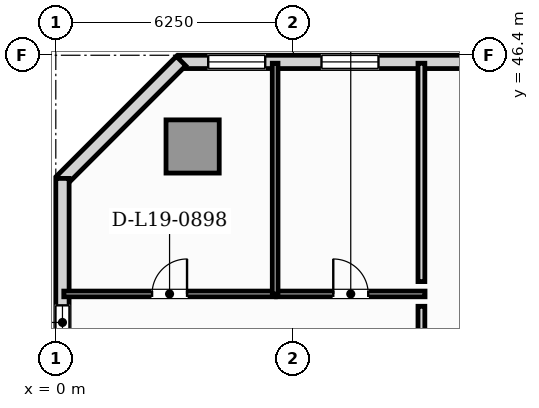
"""IFC4 building model, lengths in metres.
Left out: names, types, materials, properties, quantities, classifications, styles, units other than length and angle.
Written with IfcOpenShell. Run it as: python <this file> out.ifc"""

import sys

from ifc_helpers import new_model, si_unit, direction, frame, frame_2d, origin, origin_2d, place, context, subcontext, project, spatial, rectangle, hollow_rectangle, extrude, element, fill, save


model = new_model("IFC4")
c1 = context("Model", 3, precision=1e-05, world=origin(), true_north=direction((0.0, 1.0)))
c2 = subcontext(c1, "Body", "Model", "MODEL_VIEW")
j1 = project(units=[si_unit("LENGTHUNIT", "METRE"), si_unit("PLANEANGLEUNIT", "RADIAN")], contexts=[c1])
p1 = place(None, origin())
s1 = spatial("IfcSite", under=j1, at=p1, CompositionType="ELEMENT")
p2 = place(p1, origin())
s2 = spatial("IfcBuilding", under=s1, at=p2, CompositionType="ELEMENT")
p3 = place(p2, frame((0.0, 0.0, 81.05)))
s3 = spatial("IfcBuildingStorey", under=s2, at=p3, CompositionType="ELEMENT", Elevation=81.05)
p4 = place(p3, frame((3.6, 44.0, 0.0), z_axis=(0.0, 0.0, 1.0), x_axis=(1.0, 0.0, 0.0)))
e1 = element("IfcColumn", 1, at=p4, inside=s3, PredefinedType="USERDEFINED", context=c2, shape_type="SweptSolid", body=[
    extrude(hollow_rectangle(XDim=1.4, YDim=1.4, WallThickness=0.08, at=origin_2d()), origin(), (0.0, 0.0, 1.0), 3.85),
])
p5 = place(p3, frame((21.71, 46.225, 0.0), z_axis=(0.0, 0.0, 1.0), x_axis=(-1.0, 0.0, 0.0)))
e2 = element("IfcWall", 2, at=p5, inside=s3, PredefinedType="SOLIDWALL", context=c2, shape_type="SweptSolid", body=[
    extrude(rectangle(XDim=18.47, YDim=0.35, at=frame_2d((9.235, 0.0))), origin(), (0.0, 0.0, 1.0), 3.6),
])
p6 = place(p5, frame((16.2, 0.0, 0.9)))
e3 = element("IfcOpeningElement", 3, at=p6, cuts=e2, PredefinedType="OPENING", context=c2, shape_type="SweptSolid", body=[
    extrude(rectangle(XDim=1.5, YDim=1.95, at=frame_2d((0.75, 0.975))), frame((0.0, 0.185, 0.0), z_axis=(0.0, -1.0, 0.0), x_axis=(1.0, 0.0, 0.0)), (0.0, 0.0, 1.0), 0.37),
])
p7 = place(p5, frame((13.219, 0.0, 0.9)))
e4 = element("IfcOpeningElement", 4, at=p7, cuts=e2, PredefinedType="OPENING", context=c2, shape_type="SweptSolid", body=[
    extrude(rectangle(XDim=1.5, YDim=1.95, at=frame_2d((0.75, 0.975))), frame((0.0, 0.185, 0.0), z_axis=(0.0, -1.0, 0.0), x_axis=(1.0, 0.0, 0.0)), (0.0, 0.0, 1.0), 0.37),
])
p8 = place(p5, frame((6.384, 0.0, 0.9)))
e5 = element("IfcOpeningElement", 5, at=p8, cuts=e2, PredefinedType="OPENING", context=c2, shape_type="SweptSolid", body=[
    extrude(rectangle(XDim=1.5, YDim=1.95, at=frame_2d((0.75, 0.975))), frame((0.0, 0.185, 0.0), z_axis=(0.0, -1.0, 0.0), x_axis=(1.0, 0.0, 0.0)), (0.0, 0.0, 1.0), 0.37),
])
p9 = place(p3, frame((3.295, 46.248, 0.0), z_axis=(0.0, 0.0, 1.0), x_axis=(-0.707079321262, -0.707134240044, 0.0)))
e6 = element("IfcWall", 6, at=p9, inside=s3, PredefinedType="SOLIDWALL", context=c2, shape_type="SweptSolid", body=[
    extrude(rectangle(XDim=4.446, YDim=0.35, at=frame_2d((2.223, 0.0))), origin(), (0.0, 0.0, 1.0), 3.6),
])
p10 = place(p3, frame((0.175, 43.16, 0.0), z_axis=(0.0, 0.0, 1.0), x_axis=(0.0, -1.0, 0.0)))
e7 = element("IfcWall", 7, at=p10, inside=s3, PredefinedType="SOLIDWALL", context=c2, shape_type="SweptSolid", body=[
    extrude(rectangle(XDim=39.92, YDim=0.35, at=frame_2d((19.96, 0.0))), origin(), (0.0, 0.0, 1.0), 3.6),
])
p11 = place(p10, frame((3.34, 0.0, 0.95)))
e8 = element("IfcOpeningElement", 8, at=p11, cuts=e7, PredefinedType="OPENING", context=c2, shape_type="SweptSolid", body=[
    extrude(rectangle(XDim=0.9, YDim=1.5, at=frame_2d((0.45, 0.75))), frame((0.0, 0.185, 0.0), z_axis=(0.0, -1.0, 0.0), x_axis=(1.0, 0.0, 0.0)), (0.0, 0.0, 1.0), 0.37),
])
p12 = place(p10, frame((23.517, 0.0, 0.9)))
e9 = element("IfcOpeningElement", 9, at=p12, cuts=e7, PredefinedType="OPENING", context=c2, shape_type="SweptSolid", body=[
    extrude(rectangle(XDim=1.5, YDim=1.95, at=frame_2d((0.75, 0.975))), frame((0.0, 0.185, 0.0), z_axis=(0.0, -1.0, 0.0), x_axis=(1.0, 0.0, 0.0)), (0.0, 0.0, 1.0), 0.37),
])
p13 = place(p10, frame((12.587, 0.0, 0.9)))
e10 = element("IfcOpeningElement", 10, at=p13, cuts=e7, PredefinedType="OPENING", context=c2, shape_type="SweptSolid", body=[
    extrude(rectangle(XDim=1.5, YDim=1.95, at=frame_2d((0.75, 0.975))), frame((0.0, 0.185, 0.0), z_axis=(0.0, -1.0, 0.0), x_axis=(1.0, 0.0, 0.0)), (0.0, 0.0, 1.0), 0.37),
])
p14 = place(p3, frame((0.21, 40.12, 0.0), z_axis=(0.0, 0.0, 1.0), x_axis=(1.0, 0.0, 0.0)))
e11 = element("IfcWall", 11, at=p14, inside=s3, PredefinedType="PARTITIONING", context=c2, shape_type="SweptSolid", body=[
    extrude(rectangle(XDim=5.566, YDim=0.15, at=frame_2d((2.783, 0.0))), origin(), (0.0, 0.0, 1.0), 3.6),
])
p15 = place(p14, frame((2.323, 0.0, 0.0)))
e12 = element("IfcOpeningElement", 12, at=p15, cuts=e11, PredefinedType="OPENING", context=c2, shape_type="SweptSolid", body=[
    extrude(rectangle(XDim=0.92, YDim=2.1, at=frame_2d((0.46, 1.05))), frame((0.0, 0.085, 0.0), z_axis=(0.0, -1.0, 0.0), x_axis=(1.0, 0.0, 0.0)), (0.0, 0.0, 1.0), 0.17),
])
p16 = place(p3, frame((5.806, 40.12, 0.0), z_axis=(0.0, 0.0, 1.0), x_axis=(1.0, 0.0, 0.0)))
e13 = element("IfcWall", 13, at=p16, inside=s3, PredefinedType="PARTITIONING", context=c2, shape_type="SweptSolid", body=[
    extrude(rectangle(XDim=3.909, YDim=0.15, at=frame_2d((1.955, 0.0))), origin(), (0.0, 0.0, 1.0), 3.6),
])
p17 = place(p16, frame((1.494, 0.0, 0.0)))
e14 = element("IfcOpeningElement", 14, at=p17, cuts=e13, PredefinedType="OPENING", context=c2, shape_type="SweptSolid", body=[
    extrude(rectangle(XDim=0.92, YDim=2.1, at=frame_2d((0.46, 1.05))), frame((0.0, 0.085, 0.0), z_axis=(0.0, -1.0, 0.0), x_axis=(1.0, 0.0, 0.0)), (0.0, 0.0, 1.0), 0.17),
])
p18 = place(p3, frame((5.771, 40.115, 0.0), z_axis=(0.0, 0.0, 1.0), x_axis=(0.0, 1.0, 0.0)))
e15 = element("IfcWall", 15, at=p18, inside=s3, PredefinedType="PARTITIONING", context=c2, shape_type="SweptSolid", body=[
    extrude(rectangle(XDim=6.075, YDim=0.15, at=frame_2d((3.038, 0.0))), origin(), (0.0, 0.0, 1.0), 3.6),
])
p19 = place(p3, frame((9.62, 39.795, 0.0), z_axis=(0.0, 0.0, 1.0), x_axis=(0.0, -1.0, 0.0)))
e16 = element("IfcWall", 16, at=p19, inside=s3, PredefinedType="PARTITIONING", context=c2, shape_type="SweptSolid", body=[
    extrude(rectangle(XDim=0.85, YDim=0.18, at=frame_2d((0.425, 0.0))), origin(), (0.0, 0.0, 1.0), 3.6),
])
p20 = place(p3, frame((9.62, 46.19, 0.0), z_axis=(0.0, 0.0, 1.0), x_axis=(0.0, -1.0, 0.0)))
e17 = element("IfcWall", 17, at=p20, inside=s3, PredefinedType="PARTITIONING", context=c2, shape_type="SweptSolid", body=[
    extrude(rectangle(XDim=5.745, YDim=0.18, at=frame_2d((2.873, 0.0))), origin(), (0.0, 0.0, 1.0), 3.6),
])
p21 = place(p11, origin())
e18 = element("IfcWindow", 18, at=p21, inside=s3, PartitioningType="SINGLE_PANEL", PredefinedType="WINDOW", context=c2, shape_type="SweptSolid", body=[
    extrude(rectangle(XDim=0.9, YDim=1.5, at=frame_2d((0.45, 0.75))), frame((0.0, 0.03, 0.0), z_axis=(0.0, -1.0, 0.0), x_axis=(1.0, 0.0, 0.0)), (0.0, 0.0, 1.0), 0.06),
])
fill(e8, e18)
p22 = place(p6, origin())
e19 = element("IfcWindow", 19, at=p22, inside=s3, PartitioningType="SINGLE_PANEL", PredefinedType="WINDOW", context=c2, shape_type="SweptSolid", body=[
    extrude(rectangle(XDim=1.5, YDim=1.95, at=frame_2d((0.75, 0.975))), frame((0.0, 0.03, 0.0), z_axis=(0.0, -1.0, 0.0), x_axis=(1.0, 0.0, 0.0)), (0.0, 0.0, 1.0), 0.06),
])
fill(e3, e19)
p23 = place(p7, origin())
e20 = element("IfcWindow", 20, at=p23, inside=s3, PartitioningType="SINGLE_PANEL", PredefinedType="WINDOW", context=c2, shape_type="SweptSolid", body=[
    extrude(rectangle(XDim=1.5, YDim=1.95, at=frame_2d((0.75, 0.975))), frame((0.0, 0.03, 0.0), z_axis=(0.0, -1.0, 0.0), x_axis=(1.0, 0.0, 0.0)), (0.0, 0.0, 1.0), 0.06),
])
fill(e4, e20)
p24 = place(p15, origin())
e21 = element("IfcDoor", 21, at=p24, inside=s3, OperationType="SINGLE_SWING_RIGHT", PredefinedType="DOOR", context=c2, shape_type="SweptSolid", body=[
    extrude(rectangle(XDim=0.92, YDim=2.1, at=frame_2d((0.46, 1.05))), frame((0.0, 0.025, 0.0), z_axis=(0.0, -1.0, 0.0), x_axis=(1.0, 0.0, 0.0)), (0.0, 0.0, 1.0), 0.05),
])
fill(e12, e21)
p25 = place(p17, origin())
e22 = element("IfcDoor", 22, at=p25, inside=s3, OperationType="SINGLE_SWING_LEFT", PredefinedType="DOOR", context=c2, shape_type="SweptSolid", body=[
    extrude(rectangle(XDim=0.92, YDim=2.1, at=frame_2d((0.46, 1.05))), frame((0.0, 0.025, 0.0), z_axis=(0.0, -1.0, 0.0), x_axis=(1.0, 0.0, 0.0)), (0.0, 0.0, 1.0), 0.05),
])
fill(e14, e22)
save(model, sys.argv[1])
